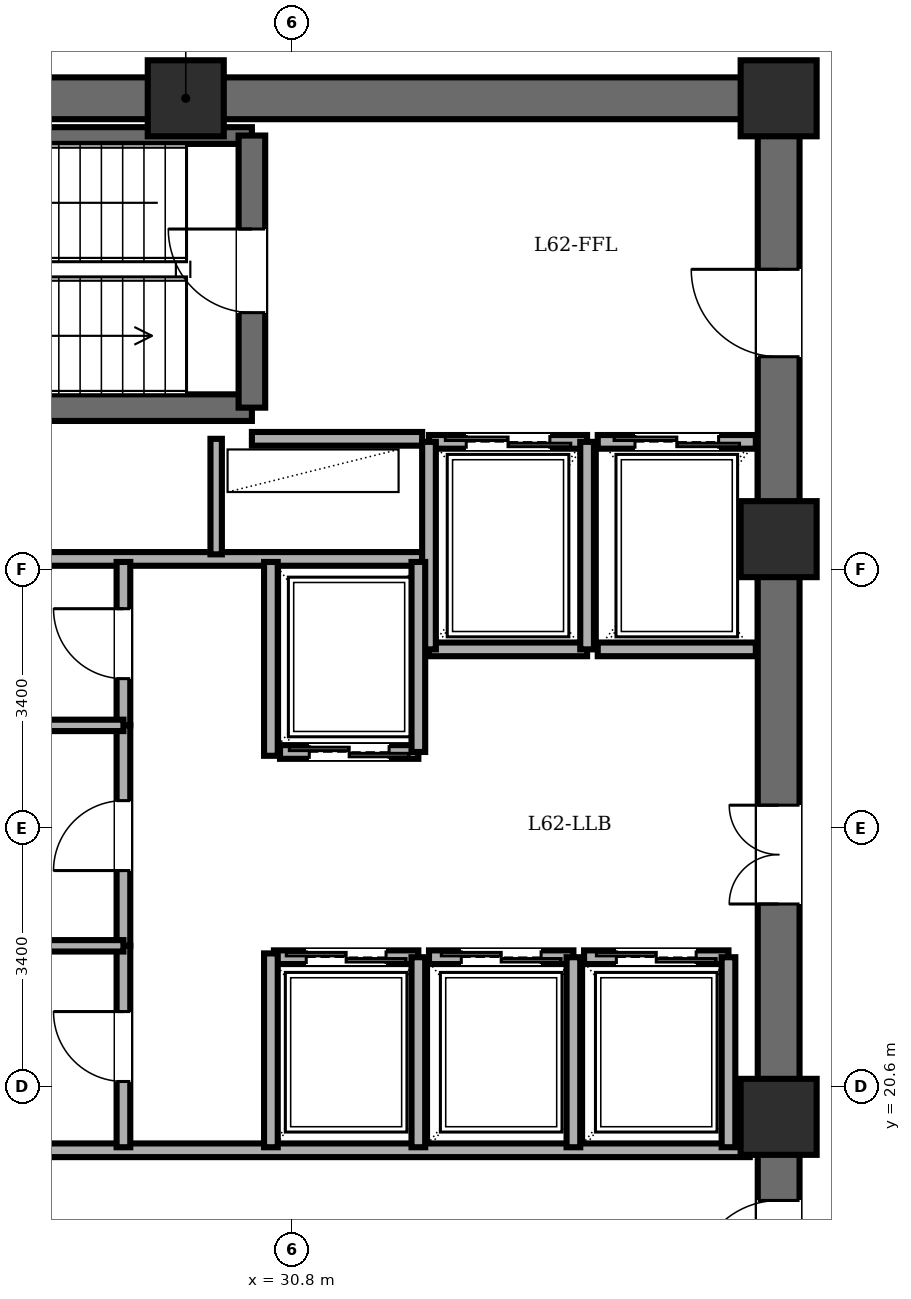
"""IFC4 building model, lengths in metres.
Left out: names, types, materials, properties, quantities, classifications, styles, units other than length and angle.
Written with IfcOpenShell. Run it as: python <this file> out.ifc"""

import sys

from ifc_helpers import new_model, si_unit, direction, frame, frame_2d, origin, origin_2d, place, context, subcontext, project, spatial, rectangle, extrude, element, fill, save


model = new_model("IFC4")
c1 = context("Model", 3, precision=1e-05, world=origin(), true_north=direction((0.0, 1.0)))
c2 = subcontext(c1, "Body", "Model", "MODEL_VIEW")
j1 = project(units=[si_unit("LENGTHUNIT", "METRE"), si_unit("PLANEANGLEUNIT", "RADIAN")], contexts=[c1])
p1 = place(None, origin())
s1 = spatial("IfcSite", under=j1, at=p1, CompositionType="ELEMENT")
p2 = place(p1, origin())
s2 = spatial("IfcBuilding", under=s1, at=p2, CompositionType="ELEMENT")
p3 = place(p2, frame((0.0, 0.0, 237.3)))
s3 = spatial("IfcBuildingStorey", under=s2, at=p3, CompositionType="ELEMENT", Elevation=237.3)
for number, where, z_axis, x_axis in (
    (1, (37.2, 20.2, 0.0), (0.0, 0.0, 1.0), (1.0, 0.0, 0.0)),
    (2, (37.2, 27.8, 0.0), (0.0, 0.0, 1.0), (1.0, 0.0, 0.0)),
    (3, (37.2, 33.6, 0.0), (0.0, 0.0, 1.0), (1.0, 0.0, 0.0)),
    (4, (29.4, 33.6, 0.0), (0.0, 0.0, 1.0), (1.0, 0.0, 0.0)),
):
    element("IfcColumn", number, at=place(p3, frame(where, z_axis=z_axis, x_axis=x_axis)), inside=s3, PredefinedType="COLUMN", context=c2, shape_type="SweptSolid", body=[
        extrude(rectangle(XDim=1.0, YDim=1.0, at=origin_2d()), origin(), (0.0, 0.0, 1.0), 3.6),
    ])
p4 = place(p3, frame((21.6, 33.6, 0.0), z_axis=(0.0, 0.0, 1.0), x_axis=(1.0, 0.0, 0.0)))
e5 = element("IfcWall", 5, at=p4, inside=s3, PredefinedType="SHEAR", context=c2, shape_type="SweptSolid", body=[
    extrude(rectangle(XDim=15.6, YDim=0.55, at=frame_2d((7.8, 0.0))), origin(), (0.0, 0.0, 1.0), 3.4),
])
p5 = place(p3, frame((37.2, 14.4, 0.0), z_axis=(0.0, 0.0, 1.0), x_axis=(0.0, 1.0, 0.0)))
e6 = element("IfcWall", 6, at=p5, inside=s3, PredefinedType="SHEAR", context=c2, shape_type="SweptSolid", body=[
    extrude(rectangle(XDim=19.2, YDim=0.55, at=frame_2d((9.6, 0.0))), origin(), (0.0, 0.0, 1.0), 3.4),
])
p6 = place(p5, frame((15.8, 0.0, 0.0)))
e7 = element("IfcOpeningElement", 7, at=p6, cuts=e6, PredefinedType="OPENING", context=c2, shape_type="SweptSolid", body=[
    extrude(rectangle(XDim=1.15, YDim=2.15, at=frame_2d((0.575, 1.075))), frame((0.0, 0.285, 0.0), z_axis=(0.0, -1.0, 0.0), x_axis=(1.0, 0.0, 0.0)), (0.0, 0.0, 1.0), 0.57),
])
p7 = place(p5, frame((3.6, 0.0, 0.0)))
e8 = element("IfcOpeningElement", 8, at=p7, cuts=e6, PredefinedType="OPENING", context=c2, shape_type="SweptSolid", body=[
    extrude(rectangle(XDim=1.1, YDim=2.15, at=frame_2d((0.55, 1.075))), frame((0.0, 0.285, 0.0), z_axis=(0.0, -1.0, 0.0), x_axis=(1.0, 0.0, 0.0)), (0.0, 0.0, 1.0), 0.57),
])
p8 = place(p5, frame((8.6, 0.0, 0.0)))
e9 = element("IfcOpeningElement", 9, at=p8, cuts=e6, PredefinedType="OPENING", context=c2, shape_type="SweptSolid", body=[
    extrude(rectangle(XDim=1.3, YDim=2.2, at=frame_2d((0.65, 1.1))), frame((0.0, 0.285, 0.0), z_axis=(0.0, -1.0, 0.0), x_axis=(1.0, 0.0, 0.0)), (0.0, 0.0, 1.0), 0.57),
])
p9 = place(p3, frame((22.48, 29.53, 0.0), z_axis=(0.0, 0.0, 1.0), x_axis=(1.0, 0.0, 0.0)))
e10 = element("IfcWall", 10, at=p9, inside=s3, PredefinedType="SOLIDWALL", context=c2, shape_type="SweptSolid", body=[
    extrude(rectangle(XDim=7.79, YDim=0.35, at=frame_2d((3.895, 0.0))), origin(), (0.0, 0.0, 1.0), 3.4),
])
p10 = place(p3, frame((22.48, 33.11, 0.0), z_axis=(0.0, 0.0, 1.0), x_axis=(1.0, 0.0, 0.0)))
e11 = element("IfcWall", 11, at=p10, inside=s3, PredefinedType="PARTITIONING", context=c2, shape_type="SweptSolid", body=[
    extrude(rectangle(XDim=7.79, YDim=0.22, at=frame_2d((3.895, 0.0))), origin(), (0.0, 0.0, 1.0), 3.4),
])
p11 = place(p3, frame((30.27, 29.53, 0.0), z_axis=(0.0, 0.0, 1.0), x_axis=(0.0, 1.0, 0.0)))
e12 = element("IfcWall", 12, at=p11, inside=s3, PredefinedType="SOLIDWALL", context=c2, shape_type="SweptSolid", body=[
    extrude(rectangle(XDim=3.58, YDim=0.35, at=frame_2d((1.79, 0.0))), origin(), (0.0, 0.0, 1.0), 3.4),
])
p12 = place(p11, frame((1.25, 0.0, 0.0)))
e13 = element("IfcOpeningElement", 13, at=p12, cuts=e12, PredefinedType="OPENING", context=c2, shape_type="SweptSolid", body=[
    extrude(rectangle(XDim=1.1, YDim=2.15, at=frame_2d((0.55, 1.075))), frame((0.0, 0.185, 0.0), z_axis=(0.0, -1.0, 0.0), x_axis=(1.0, 0.0, 0.0)), (0.0, 0.0, 1.0), 0.37),
])
p13 = place(p3, frame((30.27, 29.12, 0.0), z_axis=(0.0, 0.0, 1.0), x_axis=(1.0, 0.0, 0.0)))
e14 = element("IfcWall", 14, at=p13, inside=s3, PredefinedType="PARTITIONING", context=c2, shape_type="SweptSolid", body=[
    extrude(rectangle(XDim=2.24, YDim=0.18, at=frame_2d((1.12, 0.0))), origin(), (0.0, 0.0, 1.0), 3.4),
])
p14 = place(p3, frame((21.95, 27.54, 0.0), z_axis=(0.0, 0.0, 1.0), x_axis=(1.0, 0.0, 0.0)))
e15 = element("IfcWall", 15, at=p14, inside=s3, PredefinedType="PARTITIONING", context=c2, shape_type="SweptSolid", body=[
    extrude(rectangle(XDim=10.56, YDim=0.18, at=frame_2d((5.28, 0.0))), origin(), (0.0, 0.0, 1.0), 3.4),
])
p15 = place(p3, frame((29.8, 27.6, 0.0), z_axis=(0.0, 0.0, 1.0), x_axis=(0.0, 1.0, 0.0)))
e16 = element("IfcWall", 16, at=p15, inside=s3, PredefinedType="PARTITIONING", context=c2, shape_type="SweptSolid", body=[
    extrude(rectangle(XDim=1.52, YDim=0.15, at=frame_2d((0.76, 0.0))), origin(), (0.0, 0.0, 1.0), 3.4),
])
p16 = place(p3, frame((21.95, 19.76, 0.0), z_axis=(0.0, 0.0, 1.0), x_axis=(1.0, 0.0, 0.0)))
e17 = element("IfcWall", 17, at=p16, inside=s3, PredefinedType="PARTITIONING", context=c2, shape_type="SweptSolid", body=[
    extrude(rectangle(XDim=14.87, YDim=0.18, at=frame_2d((7.435, 0.0))), origin(), (0.0, 0.0, 1.0), 3.4),
])
p17 = place(p3, frame((32.6, 29.08, 0.0), z_axis=(0.0, 0.0, 1.0), x_axis=(1.0, 0.0, 0.0)))
e18 = element("IfcWall", 18, at=p17, inside=s3, PredefinedType="PARTITIONING", context=c2, shape_type="SweptSolid", body=[
    extrude(rectangle(XDim=2.08, YDim=0.18, at=frame_2d((1.04, 0.0))), origin(), (0.0, 0.0, 1.0), 3.4),
])
p18 = place(p17, frame((0.49, 0.0, 0.0)))
e19 = element("IfcOpeningElement", 19, at=p18, cuts=e18, PredefinedType="OPENING", context=c2, shape_type="SweptSolid", body=[
    extrude(rectangle(XDim=1.1, YDim=2.2, at=frame_2d((0.55, 1.1))), frame((0.0, 0.1, 0.0), z_axis=(0.0, -1.0, 0.0), x_axis=(1.0, 0.0, 0.0)), (0.0, 0.0, 1.0), 0.2),
])
p19 = place(p3, frame((34.68, 26.35, 0.0), z_axis=(0.0, 0.0, 1.0), x_axis=(-1.0, 0.0, 0.0)))
e20 = element("IfcWall", 20, at=p19, inside=s3, PredefinedType="PARTITIONING", context=c2, shape_type="SweptSolid", body=[
    extrude(rectangle(XDim=2.08, YDim=0.18, at=frame_2d((1.04, 0.0))), origin(), (0.0, 0.0, 1.0), 3.4),
])
for number, where, z_axis, x_axis in (
    (21, (34.68, 26.35, 0.0), (0.0, 0.0, 1.0), (0.0, 1.0, 0.0)),
    (22, (32.6, 29.08, 0.0), (0.0, 0.0, 1.0), (0.0, -1.0, 0.0)),
):
    element("IfcWall", number, at=place(p3, frame(where, z_axis=z_axis, x_axis=x_axis)), inside=s3, PredefinedType="PARTITIONING", context=c2, shape_type="SweptSolid", body=[
        extrude(rectangle(XDim=2.73, YDim=0.18, at=frame_2d((1.365, 0.0))), origin(), (0.0, 0.0, 1.0), 3.4),
    ])
p20 = place(p3, frame((34.82, 29.08, 0.0), z_axis=(0.0, 0.0, 1.0), x_axis=(1.0, 0.0, 0.0)))
e23 = element("IfcWall", 23, at=p20, inside=s3, PredefinedType="PARTITIONING", context=c2, shape_type="SweptSolid", body=[
    extrude(rectangle(XDim=2.08, YDim=0.18, at=frame_2d((1.04, 0.0))), origin(), (0.0, 0.0, 1.0), 3.4),
])
p21 = place(p20, frame((0.49, 0.0, 0.0)))
e24 = element("IfcOpeningElement", 24, at=p21, cuts=e23, PredefinedType="OPENING", context=c2, shape_type="SweptSolid", body=[
    extrude(rectangle(XDim=1.1, YDim=2.2, at=frame_2d((0.55, 1.1))), frame((0.0, 0.1, 0.0), z_axis=(0.0, -1.0, 0.0), x_axis=(1.0, 0.0, 0.0)), (0.0, 0.0, 1.0), 0.2),
])
p22 = place(p3, frame((36.9, 26.35, 0.0), z_axis=(0.0, 0.0, 1.0), x_axis=(-1.0, 0.0, 0.0)))
e25 = element("IfcWall", 25, at=p22, inside=s3, PredefinedType="PARTITIONING", context=c2, shape_type="SweptSolid", body=[
    extrude(rectangle(XDim=2.08, YDim=0.18, at=frame_2d((1.04, 0.0))), origin(), (0.0, 0.0, 1.0), 3.4),
])
p23 = place(p3, frame((32.46, 25.0, 0.0), z_axis=(0.0, 0.0, 1.0), x_axis=(-1.0, 0.0, 0.0)))
e26 = element("IfcWall", 26, at=p23, inside=s3, PredefinedType="PARTITIONING", context=c2, shape_type="SweptSolid", body=[
    extrude(rectangle(XDim=1.82, YDim=0.18, at=frame_2d((0.91, 0.0))), origin(), (0.0, 0.0, 1.0), 3.4),
])
p24 = place(p23, frame((0.385, 0.0, 0.0)))
e27 = element("IfcOpeningElement", 27, at=p24, cuts=e26, PredefinedType="OPENING", context=c2, shape_type="SweptSolid", body=[
    extrude(rectangle(XDim=1.05, YDim=2.2, at=frame_2d((0.525, 1.1))), frame((0.0, 0.1, 0.0), z_axis=(0.0, -1.0, 0.0), x_axis=(1.0, 0.0, 0.0)), (0.0, 0.0, 1.0), 0.2),
])
p25 = place(p3, frame((32.46, 25.0, 0.0), z_axis=(0.0, 0.0, 1.0), x_axis=(0.0, 1.0, 0.0)))
e28 = element("IfcWall", 28, at=p25, inside=s3, PredefinedType="PARTITIONING", context=c2, shape_type="SweptSolid", body=[
    extrude(rectangle(XDim=2.5, YDim=0.18, at=frame_2d((1.25, 0.0))), origin(), (0.0, 0.0, 1.0), 3.4),
])
p26 = place(p3, frame((30.56, 22.3, 0.0), z_axis=(0.0, 0.0, 1.0), x_axis=(1.0, 0.0, 0.0)))
e29 = element("IfcWall", 29, at=p26, inside=s3, PredefinedType="PARTITIONING", context=c2, shape_type="SweptSolid", body=[
    extrude(rectangle(XDim=1.9, YDim=0.18, at=frame_2d((0.95, 0.0))), origin(), (0.0, 0.0, 1.0), 3.4),
])
p27 = place(p26, frame((0.425, 0.0, 0.0)))
e30 = element("IfcOpeningElement", 30, at=p27, cuts=e29, PredefinedType="OPENING", context=c2, shape_type="SweptSolid", body=[
    extrude(rectangle(XDim=1.05, YDim=2.2, at=frame_2d((0.525, 1.1))), frame((0.0, 0.1, 0.0), z_axis=(0.0, -1.0, 0.0), x_axis=(1.0, 0.0, 0.0)), (0.0, 0.0, 1.0), 0.2),
])
p28 = place(p3, frame((32.46, 19.8, 0.0), z_axis=(0.0, 0.0, 1.0), x_axis=(0.0, 1.0, 0.0)))
e31 = element("IfcWall", 31, at=p28, inside=s3, PredefinedType="PARTITIONING", context=c2, shape_type="SweptSolid", body=[
    extrude(rectangle(XDim=2.5, YDim=0.18, at=frame_2d((1.25, 0.0))), origin(), (0.0, 0.0, 1.0), 3.4),
])
p29 = place(p3, frame((32.6, 22.3, 0.0), z_axis=(0.0, 0.0, 1.0), x_axis=(1.0, 0.0, 0.0)))
e32 = element("IfcWall", 32, at=p29, inside=s3, PredefinedType="PARTITIONING", context=c2, shape_type="SweptSolid", body=[
    extrude(rectangle(XDim=1.9, YDim=0.18, at=frame_2d((0.95, 0.0))), origin(), (0.0, 0.0, 1.0), 3.4),
])
p30 = place(p29, frame((0.425, 0.0, 0.0)))
e33 = element("IfcOpeningElement", 33, at=p30, cuts=e32, PredefinedType="OPENING", context=c2, shape_type="SweptSolid", body=[
    extrude(rectangle(XDim=1.05, YDim=2.2, at=frame_2d((0.525, 1.1))), frame((0.0, 0.1, 0.0), z_axis=(0.0, -1.0, 0.0), x_axis=(1.0, 0.0, 0.0)), (0.0, 0.0, 1.0), 0.2),
])
p31 = place(p3, frame((34.5, 19.8, 0.0), z_axis=(0.0, 0.0, 1.0), x_axis=(0.0, 1.0, 0.0)))
e34 = element("IfcWall", 34, at=p31, inside=s3, PredefinedType="PARTITIONING", context=c2, shape_type="SweptSolid", body=[
    extrude(rectangle(XDim=2.5, YDim=0.18, at=frame_2d((1.25, 0.0))), origin(), (0.0, 0.0, 1.0), 3.4),
])
p32 = place(p3, frame((34.64, 22.3, 0.0), z_axis=(0.0, 0.0, 1.0), x_axis=(1.0, 0.0, 0.0)))
e35 = element("IfcWall", 35, at=p32, inside=s3, PredefinedType="PARTITIONING", context=c2, shape_type="SweptSolid", body=[
    extrude(rectangle(XDim=1.9, YDim=0.18, at=frame_2d((0.95, 0.0))), origin(), (0.0, 0.0, 1.0), 3.4),
])
p33 = place(p32, frame((0.425, 0.0, 0.0)))
e36 = element("IfcOpeningElement", 36, at=p33, cuts=e35, PredefinedType="OPENING", context=c2, shape_type="SweptSolid", body=[
    extrude(rectangle(XDim=1.05, YDim=2.2, at=frame_2d((0.525, 1.1))), frame((0.0, 0.1, 0.0), z_axis=(0.0, -1.0, 0.0), x_axis=(1.0, 0.0, 0.0)), (0.0, 0.0, 1.0), 0.2),
])
p34 = place(p3, frame((36.54, 19.8, 0.0), z_axis=(0.0, 0.0, 1.0), x_axis=(0.0, 1.0, 0.0)))
e37 = element("IfcWall", 37, at=p34, inside=s3, PredefinedType="PARTITIONING", context=c2, shape_type="SweptSolid", body=[
    extrude(rectangle(XDim=2.5, YDim=0.18, at=frame_2d((1.25, 0.0))), origin(), (0.0, 0.0, 1.0), 3.4),
])
for number, where, z_axis, x_axis in (
    (38, (30.52, 24.95, 0.0), (0.0, 0.0, 1.0), (0.0, 1.0, 0.0)),
    (39, (30.52, 19.8, 0.0), (0.0, 0.0, 1.0), (0.0, 1.0, 0.0)),
):
    element("IfcWall", number, at=place(p3, frame(where, z_axis=z_axis, x_axis=x_axis)), inside=s3, PredefinedType="PARTITIONING", context=c2, shape_type="SweptSolid", body=[
        extrude(rectangle(XDim=2.55, YDim=0.18, at=frame_2d((1.275, 0.0))), origin(), (0.0, 0.0, 1.0), 3.4),
    ])
p35 = place(p3, frame((28.58, 25.35, 0.0), z_axis=(0.0, 0.0, 1.0), x_axis=(0.0, 1.0, 0.0)))
e40 = element("IfcWall", 40, at=p35, inside=s3, PredefinedType="PARTITIONING", context=c2, shape_type="SweptSolid", body=[
    extrude(rectangle(XDim=2.15, YDim=0.18, at=frame_2d((1.075, 0.0))), origin(), (0.0, 0.0, 1.0), 3.4),
])
p36 = place(p35, frame((0.615, 0.0, 0.0)))
e41 = element("IfcOpeningElement", 41, at=p36, cuts=e40, PredefinedType="OPENING", context=c2, shape_type="SweptSolid", body=[
    extrude(rectangle(XDim=0.92, YDim=2.1, at=frame_2d((0.46, 1.05))), frame((0.0, 0.1, 0.0), z_axis=(0.0, -1.0, 0.0), x_axis=(1.0, 0.0, 0.0)), (0.0, 0.0, 1.0), 0.2),
])
p37 = place(p3, frame((28.58, 22.45, 0.0), z_axis=(0.0, 0.0, 1.0), x_axis=(0.0, 1.0, 0.0)))
e42 = element("IfcWall", 42, at=p37, inside=s3, PredefinedType="PARTITIONING", context=c2, shape_type="SweptSolid", body=[
    extrude(rectangle(XDim=2.9, YDim=0.18, at=frame_2d((1.45, 0.0))), origin(), (0.0, 0.0, 1.0), 3.4),
])
p38 = place(p37, frame((0.99, 0.0, 0.0)))
e43 = element("IfcOpeningElement", 43, at=p38, cuts=e42, PredefinedType="OPENING", context=c2, shape_type="SweptSolid", body=[
    extrude(rectangle(XDim=0.92, YDim=2.1, at=frame_2d((0.46, 1.05))), frame((0.0, 0.1, 0.0), z_axis=(0.0, -1.0, 0.0), x_axis=(1.0, 0.0, 0.0)), (0.0, 0.0, 1.0), 0.2),
])
p39 = place(p3, frame((28.58, 19.8, 0.0), z_axis=(0.0, 0.0, 1.0), x_axis=(0.0, 1.0, 0.0)))
e44 = element("IfcWall", 44, at=p39, inside=s3, PredefinedType="PARTITIONING", context=c2, shape_type="SweptSolid", body=[
    extrude(rectangle(XDim=2.65, YDim=0.18, at=frame_2d((1.325, 0.0))), origin(), (0.0, 0.0, 1.0), 3.4),
])
p40 = place(p39, frame((0.865, 0.0, 0.0)))
e45 = element("IfcOpeningElement", 45, at=p40, cuts=e44, PredefinedType="OPENING", context=c2, shape_type="SweptSolid", body=[
    extrude(rectangle(XDim=0.92, YDim=2.1, at=frame_2d((0.46, 1.05))), frame((0.0, 0.1, 0.0), z_axis=(0.0, -1.0, 0.0), x_axis=(1.0, 0.0, 0.0)), (0.0, 0.0, 1.0), 0.2),
])
for number, where, z_axis, x_axis in (
    (46, (21.95, 25.35, 0.0), (0.0, 0.0, 1.0), (1.0, 0.0, 0.0)),
    (47, (21.95, 22.45, 0.0), (0.0, 0.0, 1.0), (1.0, 0.0, 0.0)),
):
    element("IfcWall", number, at=place(p3, frame(where, z_axis=z_axis, x_axis=x_axis)), inside=s3, PredefinedType="PARTITIONING", context=c2, shape_type="SweptSolid", body=[
        extrude(rectangle(XDim=6.63, YDim=0.15, at=frame_2d((3.315, 0.0))), origin(), (0.0, 0.0, 1.0), 3.4),
    ])
p41 = place(p12, origin())
e48 = element("IfcDoor", 48, at=p41, inside=s3, OperationType="SINGLE_SWING_RIGHT", PredefinedType="DOOR", context=c2, shape_type="SweptSolid", body=[
    extrude(rectangle(XDim=1.1, YDim=2.15, at=frame_2d((0.55, 1.075))), frame((0.0, 0.025, 0.0), z_axis=(0.0, -1.0, 0.0), x_axis=(1.0, 0.0, 0.0)), (0.0, 0.0, 1.0), 0.05),
])
fill(e13, e48)
p42 = place(p6, origin())
e49 = element("IfcDoor", 49, at=p42, inside=s3, OperationType="SINGLE_SWING_RIGHT", PredefinedType="DOOR", context=c2, shape_type="SweptSolid", body=[
    extrude(rectangle(XDim=1.15, YDim=2.15, at=frame_2d((0.575, 1.075))), frame((0.0, 0.025, 0.0), z_axis=(0.0, -1.0, 0.0), x_axis=(1.0, 0.0, 0.0)), (0.0, 0.0, 1.0), 0.05),
])
fill(e7, e49)
p43 = place(p7, origin())
e50 = element("IfcDoor", 50, at=p43, inside=s3, OperationType="SINGLE_SWING_LEFT", PredefinedType="DOOR", context=c2, shape_type="SweptSolid", body=[
    extrude(rectangle(XDim=1.1, YDim=2.15, at=frame_2d((0.55, 1.075))), frame((0.0, 0.025, 0.0), z_axis=(0.0, -1.0, 0.0), x_axis=(1.0, 0.0, 0.0)), (0.0, 0.0, 1.0), 0.05),
])
fill(e8, e50)
p44 = place(p18, origin())
e51 = element("IfcDoor", 51, at=p44, inside=s3, OperationType="DOUBLE_DOOR_SLIDING", PredefinedType="DOOR", context=c2, shape_type="SweptSolid", body=[
    extrude(rectangle(XDim=1.1, YDim=2.2, at=frame_2d((0.55, 1.1))), frame((0.0, 0.025, 0.0), z_axis=(0.0, -1.0, 0.0), x_axis=(1.0, 0.0, 0.0)), (0.0, 0.0, 1.0), 0.05),
])
fill(e19, e51)
p45 = place(p21, origin())
e52 = element("IfcDoor", 52, at=p45, inside=s3, OperationType="DOUBLE_DOOR_SLIDING", PredefinedType="DOOR", context=c2, shape_type="SweptSolid", body=[
    extrude(rectangle(XDim=1.1, YDim=2.2, at=frame_2d((0.55, 1.1))), frame((0.0, 0.025, 0.0), z_axis=(0.0, -1.0, 0.0), x_axis=(1.0, 0.0, 0.0)), (0.0, 0.0, 1.0), 0.05),
])
fill(e24, e52)
p46 = place(p24, origin())
e53 = element("IfcDoor", 53, at=p46, inside=s3, OperationType="DOUBLE_DOOR_SLIDING", PredefinedType="DOOR", context=c2, shape_type="SweptSolid", body=[
    extrude(rectangle(XDim=1.05, YDim=2.2, at=frame_2d((0.525, 1.1))), frame((0.0, 0.025, 0.0), z_axis=(0.0, -1.0, 0.0), x_axis=(1.0, 0.0, 0.0)), (0.0, 0.0, 1.0), 0.05),
])
fill(e27, e53)
p47 = place(p27, origin())
e54 = element("IfcDoor", 54, at=p47, inside=s3, OperationType="DOUBLE_DOOR_SLIDING", PredefinedType="DOOR", context=c2, shape_type="SweptSolid", body=[
    extrude(rectangle(XDim=1.05, YDim=2.2, at=frame_2d((0.525, 1.1))), frame((0.0, 0.025, 0.0), z_axis=(0.0, -1.0, 0.0), x_axis=(1.0, 0.0, 0.0)), (0.0, 0.0, 1.0), 0.05),
])
fill(e30, e54)
p48 = place(p30, origin())
e55 = element("IfcDoor", 55, at=p48, inside=s3, OperationType="DOUBLE_DOOR_SLIDING", PredefinedType="DOOR", context=c2, shape_type="SweptSolid", body=[
    extrude(rectangle(XDim=1.05, YDim=2.2, at=frame_2d((0.525, 1.1))), frame((0.0, 0.025, 0.0), z_axis=(0.0, -1.0, 0.0), x_axis=(1.0, 0.0, 0.0)), (0.0, 0.0, 1.0), 0.05),
])
fill(e33, e55)
p49 = place(p33, origin())
e56 = element("IfcDoor", 56, at=p49, inside=s3, OperationType="DOUBLE_DOOR_SLIDING", PredefinedType="DOOR", context=c2, shape_type="SweptSolid", body=[
    extrude(rectangle(XDim=1.05, YDim=2.2, at=frame_2d((0.525, 1.1))), frame((0.0, 0.025, 0.0), z_axis=(0.0, -1.0, 0.0), x_axis=(1.0, 0.0, 0.0)), (0.0, 0.0, 1.0), 0.05),
])
fill(e36, e56)
p50 = place(p36, origin())
e57 = element("IfcDoor", 57, at=p50, inside=s3, OperationType="SINGLE_SWING_RIGHT", PredefinedType="DOOR", context=c2, shape_type="SweptSolid", body=[
    extrude(rectangle(XDim=0.92, YDim=2.1, at=frame_2d((0.46, 1.05))), frame((0.0, 0.025, 0.0), z_axis=(0.0, -1.0, 0.0), x_axis=(1.0, 0.0, 0.0)), (0.0, 0.0, 1.0), 0.05),
])
fill(e41, e57)
p51 = place(p38, origin())
e58 = element("IfcDoor", 58, at=p51, inside=s3, OperationType="SINGLE_SWING_LEFT", PredefinedType="DOOR", context=c2, shape_type="SweptSolid", body=[
    extrude(rectangle(XDim=0.92, YDim=2.1, at=frame_2d((0.46, 1.05))), frame((0.0, 0.025, 0.0), z_axis=(0.0, -1.0, 0.0), x_axis=(1.0, 0.0, 0.0)), (0.0, 0.0, 1.0), 0.05),
])
fill(e43, e58)
p52 = place(p40, origin())
e59 = element("IfcDoor", 59, at=p52, inside=s3, OperationType="SINGLE_SWING_RIGHT", PredefinedType="DOOR", context=c2, shape_type="SweptSolid", body=[
    extrude(rectangle(XDim=0.92, YDim=2.1, at=frame_2d((0.46, 1.05))), frame((0.0, 0.025, 0.0), z_axis=(0.0, -1.0, 0.0), x_axis=(1.0, 0.0, 0.0)), (0.0, 0.0, 1.0), 0.05),
])
fill(e45, e59)
p53 = place(p8, origin())
e60 = element("IfcDoor", 60, at=p53, inside=s3, OperationType="DOUBLE_DOOR_SINGLE_SWING", PredefinedType="DOOR", context=c2, shape_type="SweptSolid", body=[
    extrude(rectangle(XDim=1.3, YDim=2.2, at=frame_2d((0.65, 1.1))), frame((0.0, 0.025, 0.0), z_axis=(0.0, -1.0, 0.0), x_axis=(1.0, 0.0, 0.0)), (0.0, 0.0, 1.0), 0.05),
])
fill(e9, e60)
save(model, sys.argv[1])
